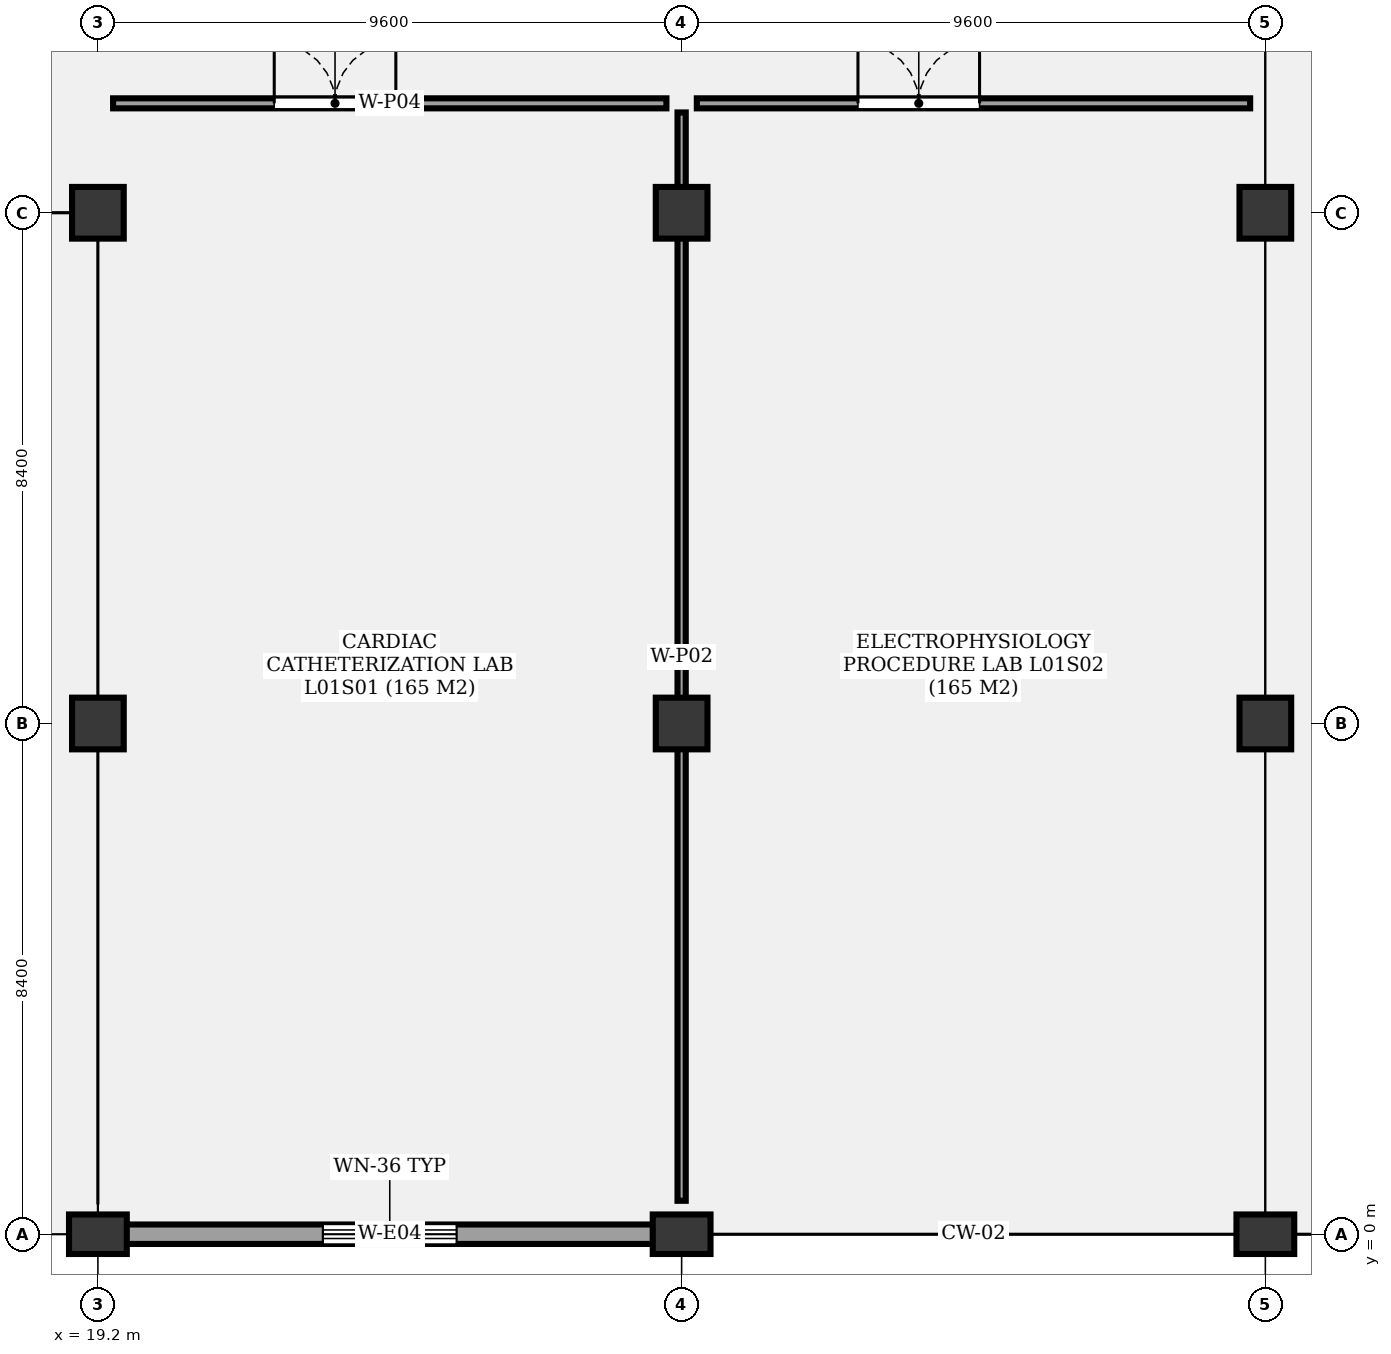
"""IFC4 building model, lengths in metres.
Left out: names, types, materials, properties, quantities, classifications, styles, units other than length and angle.
Written with IfcOpenShell. Run it as: python <this file> out.ifc"""

import sys

from ifc_helpers import new_model, si_unit, direction, frame, frame_2d, origin, origin_2d, place, context, subcontext, project, spatial, rectangle, extrude, element, fill, save


model = new_model("IFC4")
c1 = context("Model", 3, precision=1e-05, world=origin(), true_north=direction((0.0, 1.0)))
c2 = subcontext(c1, "Body", "Model", "MODEL_VIEW")
j1 = project(units=[si_unit("LENGTHUNIT", "METRE"), si_unit("PLANEANGLEUNIT", "RADIAN")], contexts=[c1])
p1 = place(None, origin())
s1 = spatial("IfcSite", under=j1, at=p1, CompositionType="ELEMENT")
p2 = place(p1, origin())
s2 = spatial("IfcBuilding", under=s1, at=p2, CompositionType="ELEMENT")
p3 = place(p2, frame((0.0, 0.0, 5.1)))
s3 = spatial("IfcBuildingStorey", under=s2, at=p3, CompositionType="ELEMENT", Elevation=5.1)
p4 = place(p3, frame((19.2, 0.0, 0.0), z_axis=(0.0, 0.0, 1.0), x_axis=(0.0, 1.0, 0.0)))
e1 = element("IfcColumn", 1, at=p4, inside=s3, PredefinedType="COLUMN", context=c2, shape_type="SweptSolid", body=[
    extrude(rectangle(XDim=0.95, YDim=0.65, at=origin_2d()), origin(), (0.0, 0.0, 1.0), 4.8),
])
for number, where, z_axis, x_axis in (
    (2, (19.2, 8.4, 0.0), (0.0, 0.0, 1.0), (1.0, 0.0, 0.0)),
    (3, (19.2, 16.8, 0.0), (0.0, 0.0, 1.0), (1.0, 0.0, 0.0)),
):
    element("IfcColumn", number, at=place(p3, frame(where, z_axis=z_axis, x_axis=x_axis)), inside=s3, PredefinedType="COLUMN", context=c2, shape_type="SweptSolid", body=[
        extrude(rectangle(XDim=0.85, YDim=0.85, at=origin_2d()), origin(), (0.0, 0.0, 1.0), 4.8),
    ])
p5 = place(p3, frame((28.8, 0.0, 0.0), z_axis=(0.0, 0.0, 1.0), x_axis=(0.0, 1.0, 0.0)))
e4 = element("IfcColumn", 4, at=p5, inside=s3, PredefinedType="COLUMN", context=c2, shape_type="SweptSolid", body=[
    extrude(rectangle(XDim=0.95, YDim=0.65, at=origin_2d()), origin(), (0.0, 0.0, 1.0), 4.8),
])
for number, where, z_axis, x_axis in (
    (5, (28.8, 8.4, 0.0), (0.0, 0.0, 1.0), (1.0, 0.0, 0.0)),
    (6, (28.8, 16.8, 0.0), (0.0, 0.0, 1.0), (1.0, 0.0, 0.0)),
):
    element("IfcColumn", number, at=place(p3, frame(where, z_axis=z_axis, x_axis=x_axis)), inside=s3, PredefinedType="COLUMN", context=c2, shape_type="SweptSolid", body=[
        extrude(rectangle(XDim=0.85, YDim=0.85, at=origin_2d()), origin(), (0.0, 0.0, 1.0), 4.8),
    ])
p6 = place(p3, frame((38.4, 0.0, 0.0), z_axis=(0.0, 0.0, 1.0), x_axis=(0.0, 1.0, 0.0)))
e7 = element("IfcColumn", 7, at=p6, inside=s3, PredefinedType="COLUMN", context=c2, shape_type="SweptSolid", body=[
    extrude(rectangle(XDim=0.95, YDim=0.65, at=origin_2d()), origin(), (0.0, 0.0, 1.0), 4.8),
])
for number, where, z_axis, x_axis in (
    (8, (38.4, 8.4, 0.0), (0.0, 0.0, 1.0), (1.0, 0.0, 0.0)),
    (9, (38.4, 16.8, 0.0), (0.0, 0.0, 1.0), (1.0, 0.0, 0.0)),
):
    element("IfcColumn", number, at=place(p3, frame(where, z_axis=z_axis, x_axis=x_axis)), inside=s3, PredefinedType="COLUMN", context=c2, shape_type="SweptSolid", body=[
        extrude(rectangle(XDim=0.85, YDim=0.85, at=origin_2d()), origin(), (0.0, 0.0, 1.0), 4.8),
    ])
p7 = place(p3, frame((28.8, 0.0, 0.0), z_axis=(0.0, 0.0, 1.0), x_axis=(-1.0, 0.0, 0.0)))
e10 = element("IfcWall", 10, at=p7, inside=s3, PredefinedType="SOLIDWALL", context=c2, shape_type="SweptSolid", body=[
    extrude(rectangle(XDim=9.6, YDim=0.32, at=frame_2d((4.8, 0.0))), origin(), (0.0, 0.0, 1.0), 3.94),
])
p8 = place(p7, frame((3.7, 0.0, 0.85)))
e11 = element("IfcOpeningElement", 11, at=p8, cuts=e10, PredefinedType="OPENING", context=c2, shape_type="SweptSolid", body=[
    extrude(rectangle(XDim=2.2, YDim=1.6, at=frame_2d((1.1, 0.8))), frame((0.0, 0.17, 0.0), z_axis=(0.0, -1.0, 0.0), x_axis=(1.0, 0.0, 0.0)), (0.0, 0.0, 1.0), 0.34),
])
p9 = place(p3, frame((19.45, 18.6, 0.0), z_axis=(0.0, 0.0, 1.0), x_axis=(1.0, 0.0, 0.0)))
e12 = element("IfcWall", 12, at=p9, inside=s3, PredefinedType="PARTITIONING", context=c2, shape_type="SweptSolid", body=[
    extrude(rectangle(XDim=9.1, YDim=0.165, at=frame_2d((4.55, 0.0))), origin(), (0.0, 0.0, 1.0), 3.68),
])
p10 = place(p9, frame((2.65, 0.0, 0.0)))
e13 = element("IfcOpeningElement", 13, at=p10, cuts=e12, PredefinedType="OPENING", context=c2, shape_type="SweptSolid", body=[
    extrude(rectangle(XDim=2.0, YDim=2.4, at=frame_2d((1.0, 1.2))), frame((0.0, 0.093, 0.0), z_axis=(0.0, -1.0, 0.0), x_axis=(1.0, 0.0, 0.0)), (0.0, 0.0, 1.0), 0.185),
])
p11 = place(p3, frame((29.05, 18.6, 0.0), z_axis=(0.0, 0.0, 1.0), x_axis=(1.0, 0.0, 0.0)))
e14 = element("IfcWall", 14, at=p11, inside=s3, PredefinedType="PARTITIONING", context=c2, shape_type="SweptSolid", body=[
    extrude(rectangle(XDim=9.1, YDim=0.165, at=frame_2d((4.55, 0.0))), origin(), (0.0, 0.0, 1.0), 3.68),
])
p12 = place(p11, frame((2.65, 0.0, 0.0)))
e15 = element("IfcOpeningElement", 15, at=p12, cuts=e14, PredefinedType="OPENING", context=c2, shape_type="SweptSolid", body=[
    extrude(rectangle(XDim=2.0, YDim=2.4, at=frame_2d((1.0, 1.2))), frame((0.0, 0.093, 0.0), z_axis=(0.0, -1.0, 0.0), x_axis=(1.0, 0.0, 0.0)), (0.0, 0.0, 1.0), 0.185),
])
p13 = place(p3, frame((28.8, 0.55, 0.0), z_axis=(0.0, 0.0, 1.0), x_axis=(0.0, 1.0, 0.0)))
e16 = element("IfcWall", 16, at=p13, inside=s3, PredefinedType="PARTITIONING", context=c2, shape_type="SweptSolid", body=[
    extrude(rectangle(XDim=17.9, YDim=0.135, at=frame_2d((8.95, 0.0))), origin(), (0.0, 0.0, 1.0), 3.68),
])
p14 = place(p8, origin())
e17 = element("IfcWindow", 17, at=p14, inside=s3, PartitioningType="SINGLE_PANEL", PredefinedType="WINDOW", context=c2, shape_type="SweptSolid", body=[
    extrude(rectangle(XDim=2.2, YDim=1.6, at=frame_2d((1.1, 0.8))), frame((0.0, 0.03, 0.0), z_axis=(0.0, -1.0, 0.0), x_axis=(1.0, 0.0, 0.0)), (0.0, 0.0, 1.0), 0.06),
])
fill(e11, e17)
p15 = place(p10, origin())
e18 = element("IfcDoor", 18, at=p15, inside=s3, OperationType="DOUBLE_DOOR_SINGLE_SWING", PredefinedType="DOOR", context=c2, shape_type="SweptSolid", body=[
    extrude(rectangle(XDim=2.0, YDim=2.4, at=frame_2d((1.0, 1.2))), frame((0.0, 0.025, 0.0), z_axis=(0.0, -1.0, 0.0), x_axis=(1.0, 0.0, 0.0)), (0.0, 0.0, 1.0), 0.05),
])
fill(e13, e18)
p16 = place(p12, origin())
e19 = element("IfcDoor", 19, at=p16, inside=s3, OperationType="DOUBLE_DOOR_SINGLE_SWING", PredefinedType="DOOR", context=c2, shape_type="SweptSolid", body=[
    extrude(rectangle(XDim=2.0, YDim=2.4, at=frame_2d((1.0, 1.2))), frame((0.0, 0.025, 0.0), z_axis=(0.0, -1.0, 0.0), x_axis=(1.0, 0.0, 0.0)), (0.0, 0.0, 1.0), 0.05),
])
fill(e15, e19)
save(model, sys.argv[1])
